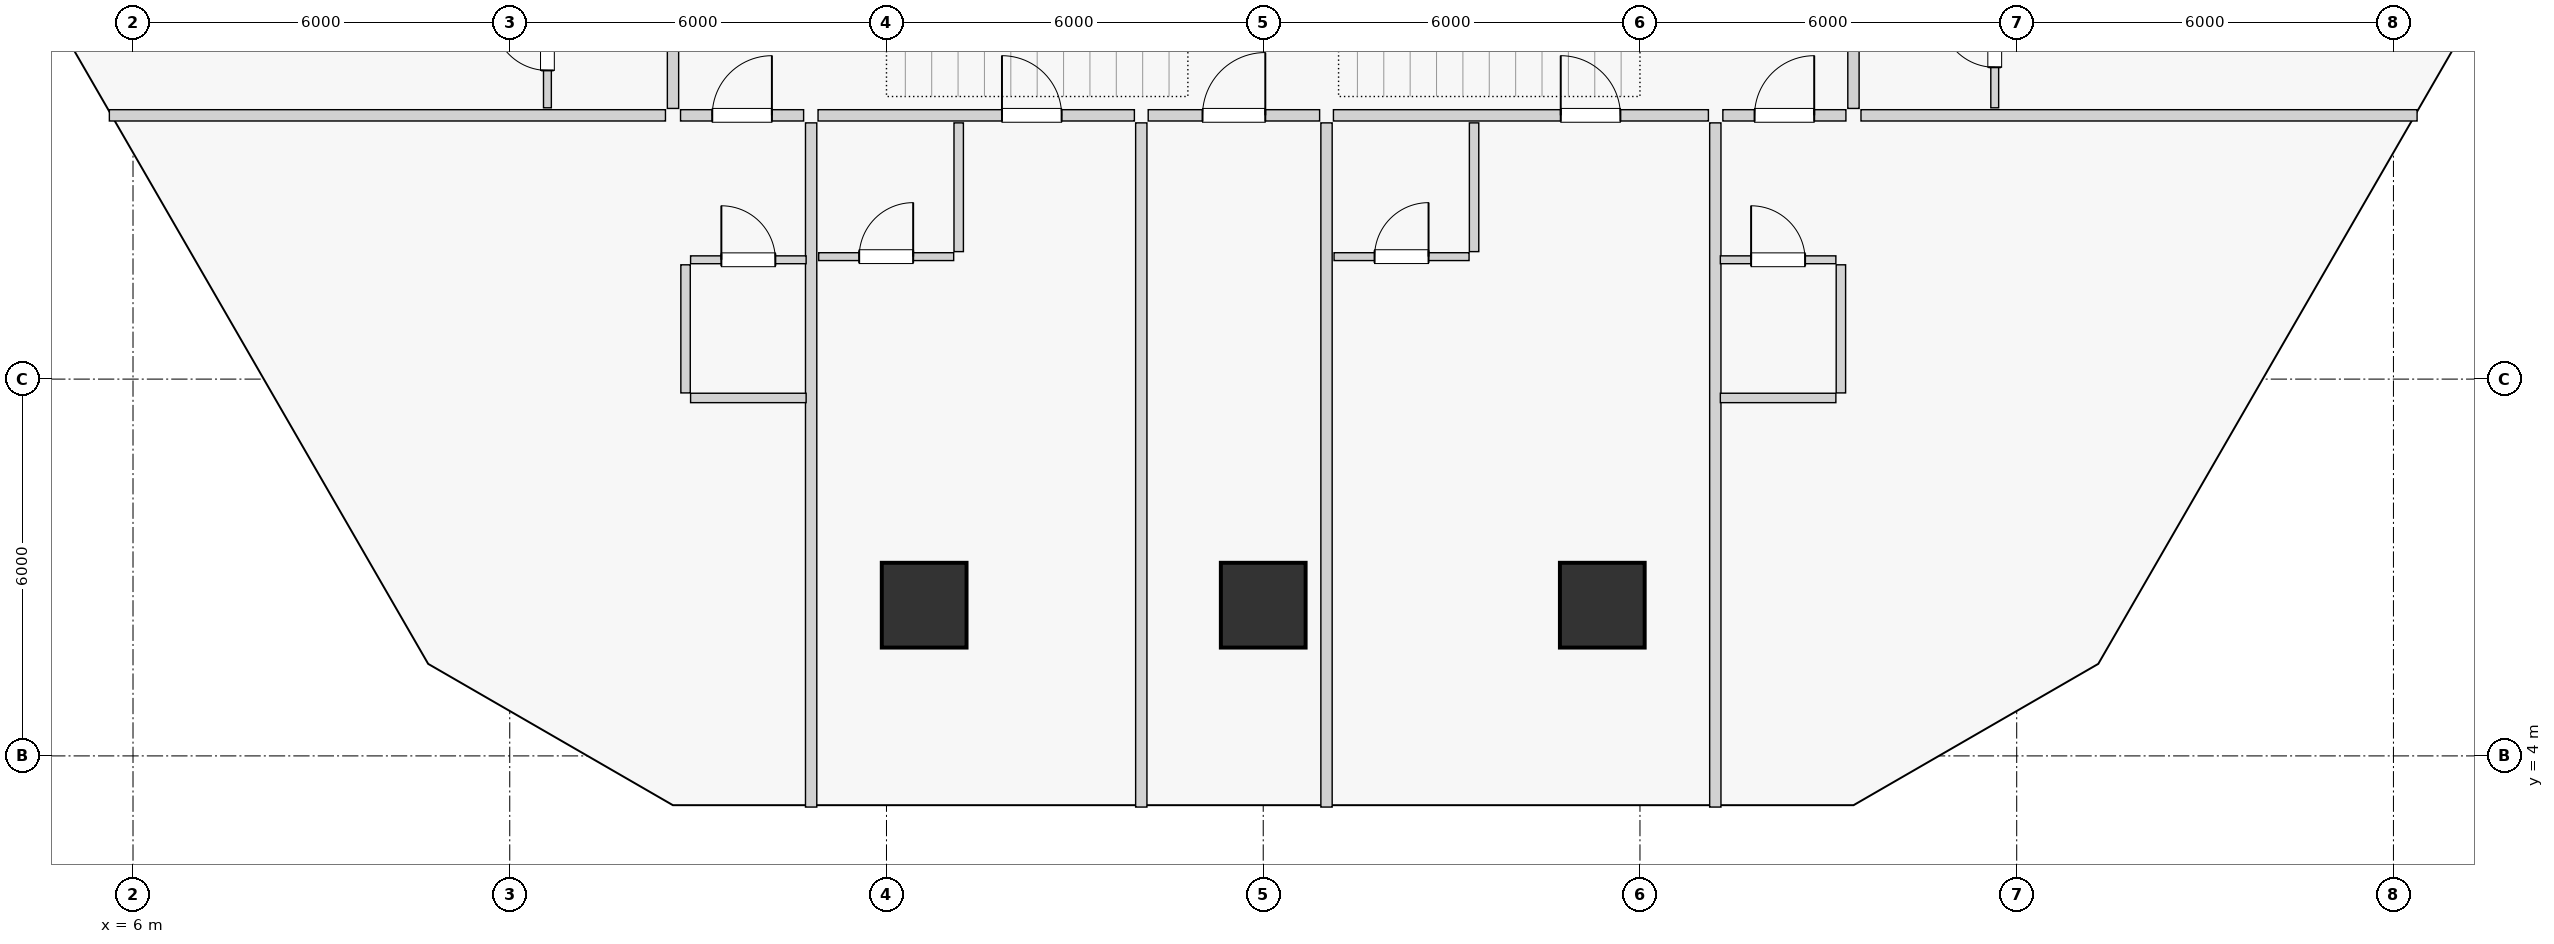
"""IFC4 building model, lengths in metres.
Left out: names, types, materials, properties, quantities, classifications, styles, units other than length and angle.
Written with IfcOpenShell. Run it as: python <this file> out.ifc"""

import sys

from ifc_helpers import new_model, si_unit, direction, frame, frame_2d, origin, origin_2d, place, context, subcontext, project, spatial, rectangle, extrude, source, transform, mapped, element, fill, save


model = new_model("IFC4")
c1 = context("Model", 3, precision=1e-05, world=origin(), true_north=direction((0.0, 1.0)))
c2 = subcontext(c1, "Body", "Model", "MODEL_VIEW")
j1 = project(units=[si_unit("LENGTHUNIT", "METRE"), si_unit("PLANEANGLEUNIT", "RADIAN")], contexts=[c1])
p1 = place(None, origin())
s1 = spatial("IfcSite", under=j1, at=p1, CompositionType="ELEMENT")
p2 = place(p1, origin())
s2 = spatial("IfcBuilding", under=s1, at=p2, CompositionType="ELEMENT")
p3 = place(p2, frame((0.0, 0.0, 22.8)))
s3 = spatial("IfcBuildingStorey", under=s2, at=p3, CompositionType="ELEMENT", Elevation=22.8)
p4 = place(p3, frame((18.6, 6.4, 0.0), z_axis=(0.0, 0.0, 1.0), x_axis=(1.0, 0.0, 0.0)))
e1 = element("IfcColumn", 1, at=p4, inside=s3, PredefinedType="COLUMN", context=c2, shape_type="SweptSolid", body=[
    extrude(rectangle(XDim=1.35, YDim=1.35, at=origin_2d()), origin(), (0.0, 0.0, 1.0), 4.5),
])
p5 = place(p3, frame((24.0, 6.4, -0.35), z_axis=(0.0, 0.0, 1.0), x_axis=(1.0, 0.0, 0.0)))
e2 = element("IfcColumn", 2, at=p5, inside=s3, PredefinedType="COLUMN", context=c2, shape_type="SweptSolid", body=[
    extrude(rectangle(XDim=1.35, YDim=1.35, at=origin_2d()), origin(), (0.0, 0.0, 1.0), 4.85),
])
p6 = place(p3, frame((29.4, 6.4, 0.0), z_axis=(0.0, 0.0, 1.0), x_axis=(1.0, 0.0, 0.0)))
e3 = element("IfcColumn", 3, at=p6, inside=s3, PredefinedType="COLUMN", context=c2, shape_type="SweptSolid", body=[
    extrude(rectangle(XDim=1.35, YDim=1.35, at=origin_2d()), origin(), (0.0, 0.0, 1.0), 4.5),
])
for number, where, z_axis, x_axis in (
    (4, (16.8, 14.08, 0.0), (0.0, 0.0, 1.0), (0.0, -1.0, 0.0)),
    (5, (31.2, 14.08, 0.0), (0.0, 0.0, 1.0), (0.0, -1.0, 0.0)),
):
    element("IfcWall", number, at=place(p3, frame(where, z_axis=z_axis, x_axis=x_axis)), inside=s3, PredefinedType="PARTITIONING", context=c2, shape_type="SweptSolid", body=[
        extrude(rectangle(XDim=10.895, YDim=0.18, at=frame_2d((5.447, 0.0))), origin(), (0.0, 0.0, 1.0), 4.25),
    ])
p7 = place(p3, frame((22.168, 14.2, 0.0), z_axis=(0.0, 0.0, 1.0), x_axis=(1.0, 0.0, 0.0)))
e6 = element("IfcWall", 6, at=p7, inside=s3, PredefinedType="PARTITIONING", context=c2, shape_type="SweptSolid", body=[
    extrude(rectangle(XDim=2.73, YDim=0.18, at=frame_2d((1.365, 0.0))), origin(), (0.0, 0.0, 1.0), 4.25),
])
p8 = place(p7, frame((0.865, 0.0, 0.0)))
e7 = element("IfcOpeningElement", 7, at=p8, cuts=e6, PredefinedType="OPENING", context=c2, shape_type="SweptSolid", body=[
    extrude(rectangle(XDim=1.0, YDim=2.01, at=frame_2d((0.5, 1.005))), frame((0.0, 0.1, 0.0), z_axis=(0.0, -1.0, 0.0), x_axis=(1.0, 0.0, 0.0)), (0.0, 0.0, 1.0), 0.2),
])
p9 = place(p3, frame((22.058, 14.08, 0.0), z_axis=(0.0, 0.0, 1.0), x_axis=(0.0, -1.0, 0.0)))
e8 = element("IfcWall", 8, at=p9, inside=s3, PredefinedType="PARTITIONING", context=c2, shape_type="SweptSolid", body=[
    extrude(rectangle(XDim=10.895, YDim=0.18, at=frame_2d((5.447, 0.0))), origin(), (0.0, 0.0, 1.0), 4.25),
])
p10 = place(p3, frame((16.91, 14.2, 0.0), z_axis=(0.0, 0.0, 1.0), x_axis=(1.0, 0.0, 0.0)))
e9 = element("IfcWall", 9, at=p10, inside=s3, PredefinedType="PARTITIONING", context=c2, shape_type="SweptSolid", body=[
    extrude(rectangle(XDim=5.038, YDim=0.18, at=frame_2d((2.519, 0.0))), origin(), (0.0, 0.0, 1.0), 4.25),
])
p11 = place(p10, frame((2.929, 0.0, 0.0)))
e10 = element("IfcOpeningElement", 10, at=p11, cuts=e9, PredefinedType="OPENING", context=c2, shape_type="SweptSolid", body=[
    extrude(rectangle(XDim=0.95, YDim=2.02, at=frame_2d((0.475, 1.01))), frame((0.0, 0.1, 0.0), z_axis=(0.0, -1.0, 0.0), x_axis=(1.0, 0.0, 0.0)), (0.0, 0.0, 1.0), 0.2),
])
p12 = place(p3, frame((19.15, 14.08, 0.0), z_axis=(0.0, 0.0, 1.0), x_axis=(0.0, -1.0, 0.0)))
e11 = element("IfcWall", 11, at=p12, inside=s3, PredefinedType="PARTITIONING", context=c2, shape_type="SweptSolid", body=[
    extrude(rectangle(XDim=2.05, YDim=0.15, at=frame_2d((1.025, 0.0))), origin(), (0.0, 0.0, 1.0), 4.25),
])
p13 = place(p3, frame((16.92, 11.95, 0.0), z_axis=(0.0, 0.0, 1.0), x_axis=(1.0, 0.0, 0.0)))
e12 = element("IfcWall", 12, at=p13, inside=s3, PredefinedType="PARTITIONING", context=c2, shape_type="SweptSolid", body=[
    extrude(rectangle(XDim=2.15, YDim=0.125, at=frame_2d((1.075, 0.0))), origin(), (0.0, 0.0, 1.0), 3.83),
])
p14 = place(p13, frame((0.645, 0.0, 0.0)))
e13 = element("IfcOpeningElement", 13, at=p14, cuts=e12, PredefinedType="OPENING", context=c2, shape_type="SweptSolid", body=[
    extrude(rectangle(XDim=0.86, YDim=2.01, at=frame_2d((0.43, 1.005))), frame((0.0, 0.073, 0.0), z_axis=(0.0, -1.0, 0.0), x_axis=(1.0, 0.0, 0.0)), (0.0, 0.0, 1.0), 0.145),
])
p15 = place(p3, frame((25.008, 14.08, 0.0), z_axis=(0.0, 0.0, 1.0), x_axis=(0.0, -1.0, 0.0)))
e14 = element("IfcWall", 14, at=p15, inside=s3, PredefinedType="PARTITIONING", context=c2, shape_type="SweptSolid", body=[
    extrude(rectangle(XDim=10.895, YDim=0.18, at=frame_2d((5.447, 0.0))), origin(), (0.0, 0.0, 1.0), 4.25),
])
p16 = place(p3, frame((25.118, 14.2, 0.0), z_axis=(0.0, 0.0, 1.0), x_axis=(1.0, 0.0, 0.0)))
e15 = element("IfcWall", 15, at=p16, inside=s3, PredefinedType="PARTITIONING", context=c2, shape_type="SweptSolid", body=[
    extrude(rectangle(XDim=5.972, YDim=0.18, at=frame_2d((2.986, 0.0))), origin(), (0.0, 0.0, 1.0), 4.25),
])
p17 = place(p16, frame((3.62, 0.0, 0.0)))
e16 = element("IfcOpeningElement", 16, at=p17, cuts=e15, PredefinedType="OPENING", context=c2, shape_type="SweptSolid", body=[
    extrude(rectangle(XDim=0.95, YDim=2.02, at=frame_2d((0.475, 1.01))), frame((0.0, 0.1, 0.0), z_axis=(0.0, -1.0, 0.0), x_axis=(1.0, 0.0, 0.0)), (0.0, 0.0, 1.0), 0.2),
])
p18 = place(p3, frame((27.358, 14.08, 0.0), z_axis=(0.0, 0.0, 1.0), x_axis=(0.0, -1.0, 0.0)))
e17 = element("IfcWall", 17, at=p18, inside=s3, PredefinedType="PARTITIONING", context=c2, shape_type="SweptSolid", body=[
    extrude(rectangle(XDim=2.05, YDim=0.15, at=frame_2d((1.025, 0.0))), origin(), (0.0, 0.0, 1.0), 4.25),
])
p19 = place(p3, frame((25.128, 11.95, 0.0), z_axis=(0.0, 0.0, 1.0), x_axis=(1.0, 0.0, 0.0)))
e18 = element("IfcWall", 18, at=p19, inside=s3, PredefinedType="PARTITIONING", context=c2, shape_type="SweptSolid", body=[
    extrude(rectangle(XDim=2.15, YDim=0.125, at=frame_2d((1.075, 0.0))), origin(), (0.0, 0.0, 1.0), 3.83),
])
p20 = place(p19, frame((0.645, 0.0, 0.0)))
e19 = element("IfcOpeningElement", 19, at=p20, cuts=e18, PredefinedType="OPENING", context=c2, shape_type="SweptSolid", body=[
    extrude(rectangle(XDim=0.86, YDim=2.01, at=frame_2d((0.43, 1.005))), frame((0.0, 0.073, 0.0), z_axis=(0.0, -1.0, 0.0), x_axis=(1.0, 0.0, 0.0)), (0.0, 0.0, 1.0), 0.145),
])
p21 = place(p3, frame((14.48, 14.2, 0.0), z_axis=(0.0, 0.0, 1.0), x_axis=(-1.0, 0.0, 0.0)))
e20 = element("IfcWall", 20, at=p21, inside=s3, PredefinedType="PARTITIONING", context=c2, shape_type="SweptSolid", body=[
    extrude(rectangle(XDim=8.857, YDim=0.18, at=frame_2d((4.428, 0.0))), origin(), (0.0, 0.0, 1.0), 4.25),
])
p22 = place(p3, frame((14.6, 14.31, 0.0), z_axis=(0.0, 0.0, 1.0), x_axis=(0.0, 1.0, 0.0)))
e21 = element("IfcWall", 21, at=p22, inside=s3, PredefinedType="PARTITIONING", context=c2, shape_type="SweptSolid", body=[
    extrude(rectangle(XDim=11.808, YDim=0.18, at=frame_2d((5.904, 0.0))), origin(), (0.0, 0.0, 1.0), 4.25),
])
p23 = place(p22, frame((3.847, 0.0, 0.0)))
e22 = element("IfcOpeningElement", 22, at=p23, cuts=e21, PredefinedType="OPENING", context=c2, shape_type="SweptSolid", body=[
    extrude(rectangle(XDim=0.95, YDim=2.02, at=frame_2d((0.475, 1.01))), frame((0.0, 0.1, 0.0), z_axis=(0.0, -1.0, 0.0), x_axis=(1.0, 0.0, 0.0)), (0.0, 0.0, 1.0), 0.2),
])
p24 = place(p3, frame((12.6, 14.32, 0.0), z_axis=(0.0, 0.0, 1.0), x_axis=(0.0, 1.0, 0.0)))
e23 = element("IfcWall", 23, at=p24, inside=s3, PredefinedType="PARTITIONING", context=c2, shape_type="SweptSolid", body=[
    extrude(rectangle(XDim=2.05, YDim=0.125, at=frame_2d((1.025, 0.0))), origin(), (0.0, 0.0, 1.0), 4.25),
])
p25 = place(p24, frame((0.595, 0.0, 0.0)))
e24 = element("IfcOpeningElement", 24, at=p25, cuts=e23, PredefinedType="OPENING", context=c2, shape_type="SweptSolid", body=[
    extrude(rectangle(XDim=0.86, YDim=2.01, at=frame_2d((0.43, 1.005))), frame((0.0, 0.073, 0.0), z_axis=(0.0, -1.0, 0.0), x_axis=(1.0, 0.0, 0.0)), (0.0, 0.0, 1.0), 0.145),
])
p26 = place(p3, frame((33.52, 14.2, 0.0), z_axis=(0.0, 0.0, 1.0), x_axis=(1.0, 0.0, 0.0)))
e25 = element("IfcWall", 25, at=p26, inside=s3, PredefinedType="PARTITIONING", context=c2, shape_type="SweptSolid", body=[
    extrude(rectangle(XDim=8.857, YDim=0.18, at=frame_2d((4.428, 0.0))), origin(), (0.0, 0.0, 1.0), 4.25),
])
p27 = place(p3, frame((33.4, 14.31, 0.0), z_axis=(0.0, 0.0, 1.0), x_axis=(0.0, 1.0, 0.0)))
e26 = element("IfcWall", 26, at=p27, inside=s3, PredefinedType="PARTITIONING", context=c2, shape_type="SweptSolid", body=[
    extrude(rectangle(XDim=7.888, YDim=0.18, at=frame_2d((3.944, 0.0))), origin(), (0.0, 0.0, 1.0), 4.25),
])
p28 = place(p27, frame((5.038, 0.0, 0.0)))
e27 = element("IfcOpeningElement", 27, at=p28, cuts=e26, PredefinedType="OPENING", context=c2, shape_type="SweptSolid", body=[
    extrude(rectangle(XDim=0.95, YDim=2.02, at=frame_2d((0.475, 1.01))), frame((0.0, 0.1, 0.0), z_axis=(0.0, -1.0, 0.0), x_axis=(1.0, 0.0, 0.0)), (0.0, 0.0, 1.0), 0.2),
])
p29 = place(p3, frame((35.65, 14.32, 0.0), z_axis=(0.0, 0.0, 1.0), x_axis=(0.0, 1.0, 0.0)))
e28 = element("IfcWall", 28, at=p29, inside=s3, PredefinedType="PARTITIONING", context=c2, shape_type="SweptSolid", body=[
    extrude(rectangle(XDim=2.15, YDim=0.125, at=frame_2d((1.075, 0.0))), origin(), (0.0, 0.0, 1.0), 4.25),
])
p30 = place(p29, frame((0.645, 0.0, 0.0)))
e29 = element("IfcOpeningElement", 29, at=p30, cuts=e28, PredefinedType="OPENING", context=c2, shape_type="SweptSolid", body=[
    extrude(rectangle(XDim=0.86, YDim=2.01, at=frame_2d((0.43, 1.005))), frame((0.0, 0.073, 0.0), z_axis=(0.0, -1.0, 0.0), x_axis=(1.0, 0.0, 0.0)), (0.0, 0.0, 1.0), 0.145),
])
p31 = place(p3, frame((14.72, 14.2, 0.0), z_axis=(0.0, 0.0, 1.0), x_axis=(1.0, 0.0, 0.0)))
e30 = element("IfcWall", 30, at=p31, inside=s3, PredefinedType="PARTITIONING", context=c2, shape_type="SweptSolid", body=[
    extrude(rectangle(XDim=1.96, YDim=0.18, at=frame_2d((0.98, 0.0))), origin(), (0.0, 0.0, 1.0), 4.25),
])
p32 = place(p31, frame((0.505, 0.0, 0.0)))
e31 = element("IfcOpeningElement", 31, at=p32, cuts=e30, PredefinedType="OPENING", context=c2, shape_type="SweptSolid", body=[
    extrude(rectangle(XDim=0.95, YDim=2.02, at=frame_2d((0.475, 1.01))), frame((0.0, 0.1, 0.0), z_axis=(0.0, -1.0, 0.0), x_axis=(1.0, 0.0, 0.0)), (0.0, 0.0, 1.0), 0.2),
])
p33 = place(p3, frame((14.88, 11.9, 0.0), z_axis=(0.0, 0.0, 1.0), x_axis=(1.0, 0.0, 0.0)))
e32 = element("IfcWall", 32, at=p33, inside=s3, PredefinedType="PARTITIONING", context=c2, shape_type="SweptSolid", body=[
    extrude(rectangle(XDim=1.84, YDim=0.125, at=frame_2d((0.92, 0.0))), origin(), (0.0, 0.0, 1.0), 4.25),
])
p34 = place(p33, frame((0.49, 0.0, 0.0)))
e33 = element("IfcOpeningElement", 33, at=p34, cuts=e32, PredefinedType="OPENING", context=c2, shape_type="SweptSolid", body=[
    extrude(rectangle(XDim=0.86, YDim=2.01, at=frame_2d((0.43, 1.005))), frame((0.0, 0.073, 0.0), z_axis=(0.0, -1.0, 0.0), x_axis=(1.0, 0.0, 0.0)), (0.0, 0.0, 1.0), 0.145),
])
p35 = place(p3, frame((14.88, 9.7, 0.0), z_axis=(0.0, 0.0, 1.0), x_axis=(1.0, 0.0, 0.0)))
e34 = element("IfcWall", 34, at=p35, inside=s3, PredefinedType="PARTITIONING", context=c2, shape_type="SweptSolid", body=[
    extrude(rectangle(XDim=1.84, YDim=0.15, at=frame_2d((0.92, 0.0))), origin(), (0.0, 0.0, 1.0), 4.25),
])
p36 = place(p3, frame((14.8, 9.78, 0.0), z_axis=(0.0, 0.0, 1.0), x_axis=(0.0, 1.0, 0.0)))
e35 = element("IfcWall", 35, at=p36, inside=s3, PredefinedType="PARTITIONING", context=c2, shape_type="SweptSolid", body=[
    extrude(rectangle(XDim=2.04, YDim=0.15, at=frame_2d((1.02, 0.0))), origin(), (0.0, 0.0, 1.0), 4.25),
])
p37 = place(p3, frame((31.32, 14.2, 0.0), z_axis=(0.0, 0.0, 1.0), x_axis=(1.0, 0.0, 0.0)))
e36 = element("IfcWall", 36, at=p37, inside=s3, PredefinedType="PARTITIONING", context=c2, shape_type="SweptSolid", body=[
    extrude(rectangle(XDim=1.96, YDim=0.18, at=frame_2d((0.98, 0.0))), origin(), (0.0, 0.0, 1.0), 4.25),
])
p38 = place(p37, frame((0.505, 0.0, 0.0)))
e37 = element("IfcOpeningElement", 37, at=p38, cuts=e36, PredefinedType="OPENING", context=c2, shape_type="SweptSolid", body=[
    extrude(rectangle(XDim=0.95, YDim=2.02, at=frame_2d((0.475, 1.01))), frame((0.0, 0.1, 0.0), z_axis=(0.0, -1.0, 0.0), x_axis=(1.0, 0.0, 0.0)), (0.0, 0.0, 1.0), 0.2),
])
p39 = place(p3, frame((31.28, 11.9, 0.0), z_axis=(0.0, 0.0, 1.0), x_axis=(1.0, 0.0, 0.0)))
e38 = element("IfcWall", 38, at=p39, inside=s3, PredefinedType="PARTITIONING", context=c2, shape_type="SweptSolid", body=[
    extrude(rectangle(XDim=1.84, YDim=0.125, at=frame_2d((0.92, 0.0))), origin(), (0.0, 0.0, 1.0), 4.25),
])
p40 = place(p39, frame((0.49, 0.0, 0.0)))
e39 = element("IfcOpeningElement", 39, at=p40, cuts=e38, PredefinedType="OPENING", context=c2, shape_type="SweptSolid", body=[
    extrude(rectangle(XDim=0.86, YDim=2.01, at=frame_2d((0.43, 1.005))), frame((0.0, 0.073, 0.0), z_axis=(0.0, -1.0, 0.0), x_axis=(1.0, 0.0, 0.0)), (0.0, 0.0, 1.0), 0.145),
])
p41 = place(p3, frame((31.28, 9.7, 0.0), z_axis=(0.0, 0.0, 1.0), x_axis=(1.0, 0.0, 0.0)))
e40 = element("IfcWall", 40, at=p41, inside=s3, PredefinedType="PARTITIONING", context=c2, shape_type="SweptSolid", body=[
    extrude(rectangle(XDim=1.84, YDim=0.15, at=frame_2d((0.92, 0.0))), origin(), (0.0, 0.0, 1.0), 4.25),
])
p42 = place(p3, frame((33.2, 9.78, 0.0), z_axis=(0.0, 0.0, 1.0), x_axis=(0.0, 1.0, 0.0)))
e41 = element("IfcWall", 41, at=p42, inside=s3, PredefinedType="PARTITIONING", context=c2, shape_type="SweptSolid", body=[
    extrude(rectangle(XDim=2.04, YDim=0.15, at=frame_2d((1.02, 0.0))), origin(), (0.0, 0.0, 1.0), 4.25),
])
m1 = source(origin(), c2, "Body", "SweptSolid", [
    extrude(rectangle(XDim=1.0, YDim=2.01, at=frame_2d((0.5, 1.005))), frame((0.0, 0.025, 0.0), z_axis=(0.0, -1.0, 0.0), x_axis=(1.0, 0.0, 0.0)), (0.0, 0.0, 1.0), 0.05),
])
p43 = place(p8, origin())
e42 = element("IfcDoor", 42, at=p43, inside=s3, OperationType="SINGLE_SWING_RIGHT", PredefinedType="DOOR", context=c2, shape_type="MappedRepresentation", body=[
    mapped(m1, transform((0.0, 0.0, 0.0), scale=1.0)),
])
fill(e7, e42)
m2 = source(origin(), c2, "Body", "SweptSolid", [
    extrude(rectangle(XDim=0.95, YDim=2.02, at=frame_2d((0.475, 1.01))), frame((0.0, 0.025, 0.0), z_axis=(0.0, -1.0, 0.0), x_axis=(1.0, 0.0, 0.0)), (0.0, 0.0, 1.0), 0.05),
])
p44 = place(p11, origin())
e43 = element("IfcDoor", 43, at=p44, inside=s3, OperationType="SINGLE_SWING_LEFT", PredefinedType="DOOR", context=c2, shape_type="MappedRepresentation", body=[
    mapped(m2, transform((0.0, 0.0, 0.0), scale=1.0)),
])
fill(e10, e43)
m3 = source(origin(), c2, "Body", "SweptSolid", [
    extrude(rectangle(XDim=0.86, YDim=2.01, at=frame_2d((0.43, 1.005))), frame((0.0, 0.025, 0.0), z_axis=(0.0, -1.0, 0.0), x_axis=(1.0, 0.0, 0.0)), (0.0, 0.0, 1.0), 0.05),
])
p45 = place(p14, origin())
e44 = element("IfcDoor", 44, at=p45, inside=s3, OperationType="SINGLE_SWING_RIGHT", PredefinedType="DOOR", context=c2, shape_type="MappedRepresentation", body=[
    mapped(m3, transform((0.0, 0.0, 0.0), scale=1.0)),
])
fill(e13, e44)
p46 = place(p17, origin())
e45 = element("IfcDoor", 45, at=p46, inside=s3, OperationType="SINGLE_SWING_LEFT", PredefinedType="DOOR", context=c2, shape_type="MappedRepresentation", body=[
    mapped(m2, transform((0.0, 0.0, 0.0), scale=1.0)),
])
fill(e16, e45)
p47 = place(p20, origin())
e46 = element("IfcDoor", 46, at=p47, inside=s3, OperationType="SINGLE_SWING_RIGHT", PredefinedType="DOOR", context=c2, shape_type="MappedRepresentation", body=[
    mapped(m3, transform((0.0, 0.0, 0.0), scale=1.0)),
])
fill(e19, e46)
p48 = place(p25, origin())
e47 = element("IfcDoor", 47, at=p48, inside=s3, OperationType="SINGLE_SWING_RIGHT", PredefinedType="DOOR", context=c2, shape_type="MappedRepresentation", body=[
    mapped(m3, transform((0.0, 0.0, 0.0), scale=1.0)),
])
fill(e24, e47)
p49 = place(p30, origin())
e48 = element("IfcDoor", 48, at=p49, inside=s3, OperationType="SINGLE_SWING_RIGHT", PredefinedType="DOOR", context=c2, shape_type="MappedRepresentation", body=[
    mapped(m3, transform((0.0, 0.0, 0.0), scale=1.0)),
])
fill(e29, e48)
p50 = place(p32, origin())
e49 = element("IfcDoor", 49, at=p50, inside=s3, OperationType="SINGLE_SWING_RIGHT", PredefinedType="DOOR", context=c2, shape_type="MappedRepresentation", body=[
    mapped(m2, transform((0.0, 0.0, 0.0), scale=1.0)),
])
fill(e31, e49)
p51 = place(p34, origin())
e50 = element("IfcDoor", 50, at=p51, inside=s3, OperationType="SINGLE_SWING_LEFT", PredefinedType="DOOR", context=c2, shape_type="MappedRepresentation", body=[
    mapped(m3, transform((0.0, 0.0, 0.0), scale=1.0)),
])
fill(e33, e50)
p52 = place(p38, origin())
e51 = element("IfcDoor", 51, at=p52, inside=s3, OperationType="SINGLE_SWING_RIGHT", PredefinedType="DOOR", context=c2, shape_type="MappedRepresentation", body=[
    mapped(m2, transform((0.0, 0.0, 0.0), scale=1.0)),
])
fill(e37, e51)
p53 = place(p40, origin())
e52 = element("IfcDoor", 52, at=p53, inside=s3, OperationType="SINGLE_SWING_LEFT", PredefinedType="DOOR", context=c2, shape_type="MappedRepresentation", body=[
    mapped(m3, transform((0.0, 0.0, 0.0), scale=1.0)),
])
fill(e39, e52)
save(model, sys.argv[1])
